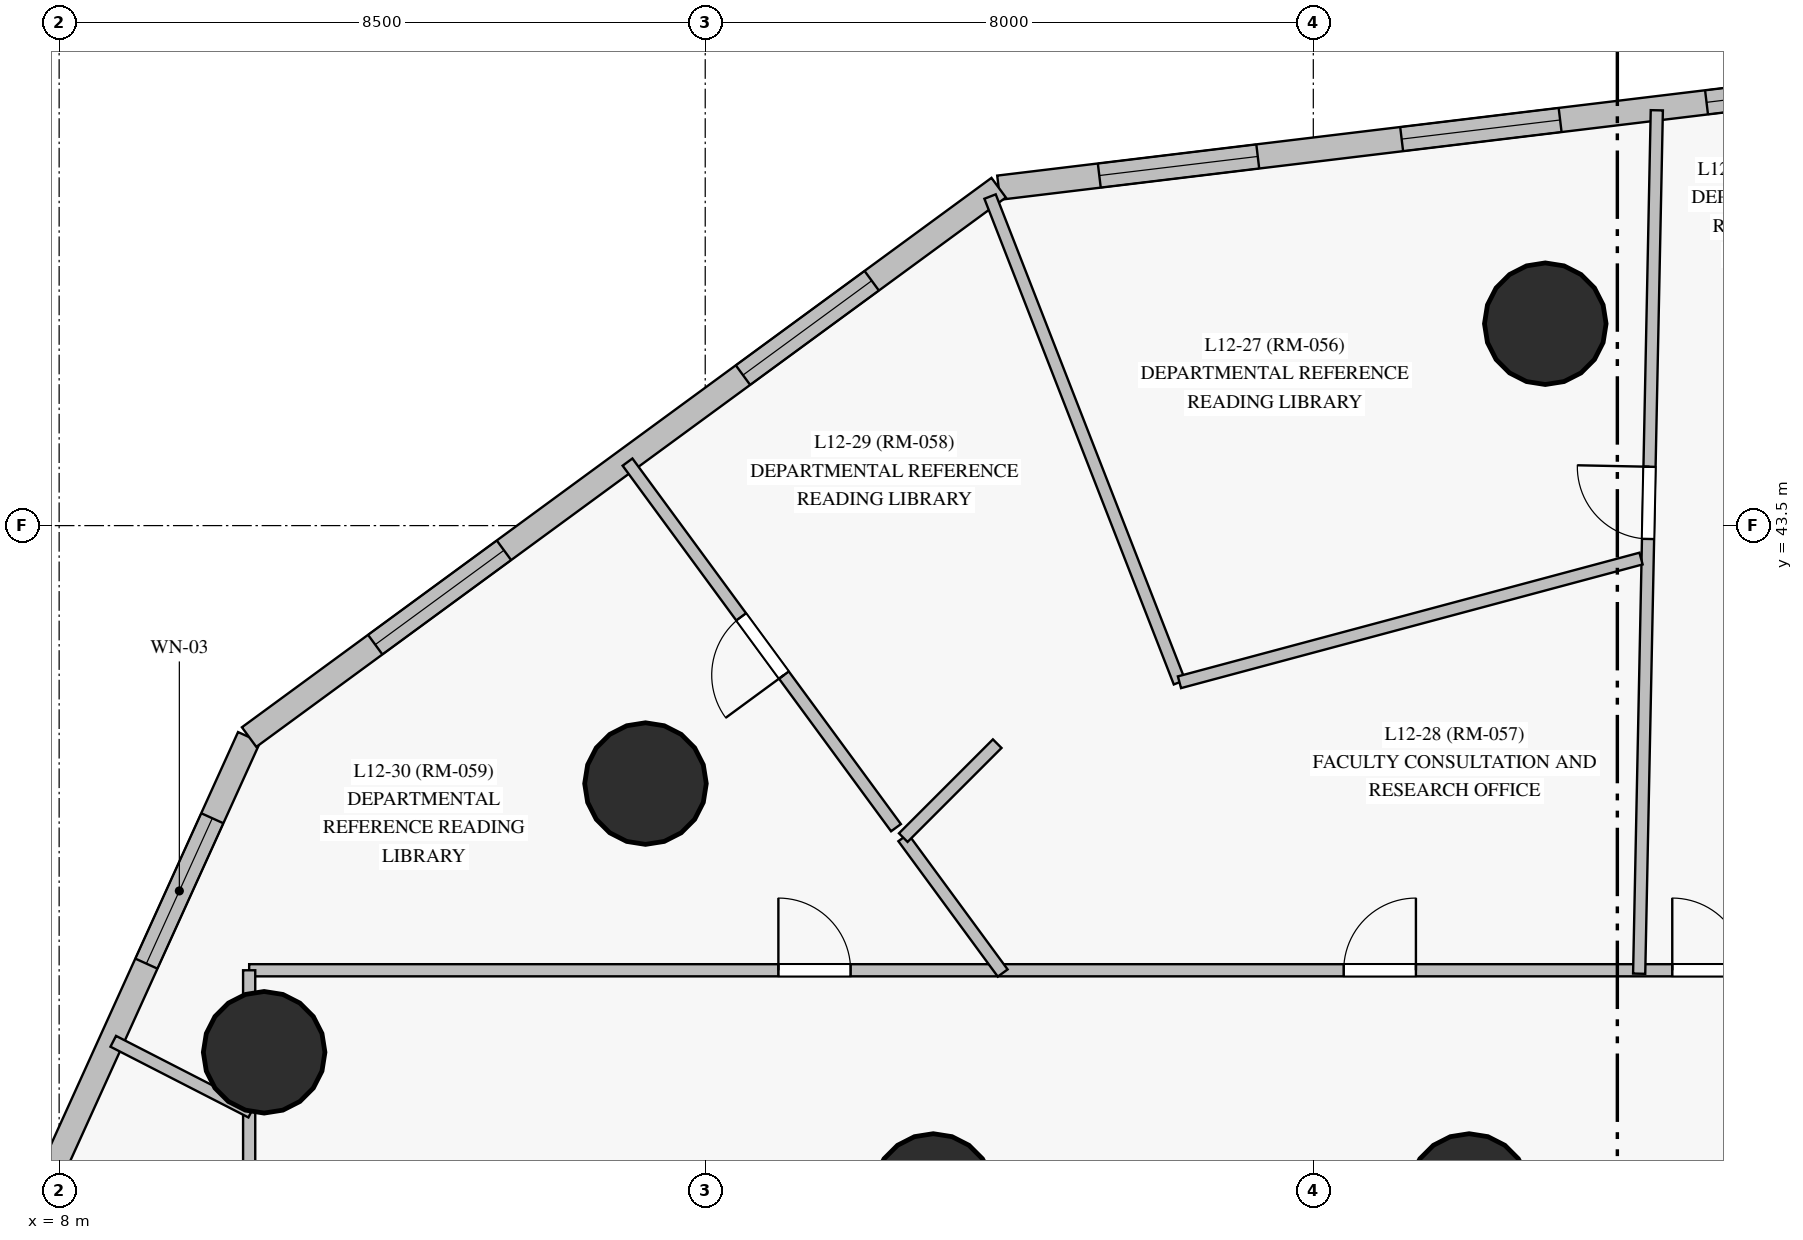
"""IFC4 building model, lengths in metres.
Left out: names, types, materials, properties, quantities, classifications, styles, units other than length and angle.
Written with IfcOpenShell. Run it as: python <this file> out.ifc"""

import sys

from ifc_helpers import new_model, si_unit, direction, frame, frame_2d, origin, origin_with_axes, origin_2d, place, context, subcontext, project, spatial, rectangle, circle, extrude, source, transform, mapped, element, fill, save


model = new_model("IFC4")
c1 = context("Model", 3, precision=1e-05, world=origin(), true_north=direction((0.0, 1.0)))
c2 = subcontext(c1, "Body", "Model", "MODEL_VIEW")
j1 = project(units=[si_unit("LENGTHUNIT", "METRE"), si_unit("PLANEANGLEUNIT", "RADIAN")], contexts=[c1])
p1 = place(None, origin())
s1 = spatial("IfcSite", under=j1, at=p1, CompositionType="ELEMENT")
p2 = place(p1, origin())
s2 = spatial("IfcBuilding", under=s1, at=p2, CompositionType="ELEMENT")
p3 = place(p2, frame((0.0, 0.0, 48.1)))
s3 = spatial("IfcBuildingStorey", under=s2, at=p3, CompositionType="ELEMENT", Elevation=48.1)
m1 = source(origin_with_axes(), c2, "Body", "SweptSolid", [
    extrude(circle(Radius=0.8, at=origin_2d()), origin(), (0.0, 0.0, 1.0), 3.6),
])
for number, where, z_axis, x_axis in (
    (1, (19.5, 34.7, 0.0), (0.0, 0.0, 1.0), (1.0, 0.0, 0.0)),
    (2, (26.55, 34.7, 0.0), (0.0, 0.0, 1.0), (1.0, 0.0, 0.0)),
    (3, (27.552, 46.156, 0.0), (0.0, 0.0, 1.0), (1.0, 0.0, 0.0)),
    (4, (15.714, 40.106, 0.0), (0.0, 0.0, 1.0), (1.0, 0.0, 0.0)),
    (5, (10.697, 36.571, 0.0), (0.0, 0.0, 1.0), (1.0, 0.0, 0.0)),
):
    element("IfcColumn", number, at=place(p3, frame(where, z_axis=z_axis, x_axis=x_axis)), inside=s3, PredefinedType="COLUMN", context=c2, shape_type="MappedRepresentation", body=[
        mapped(m1, transform((0.0, 0.0, 0.0), scale=1.0)),
    ])
p4 = place(p3, frame((10.499, 40.718, 0.0), z_axis=(0.0, 0.0, 1.0), x_axis=(-0.41300414516, -0.91072914529, 0.0)))
e6 = element("IfcWall", 6, at=p4, inside=s3, PredefinedType="SOLIDWALL", context=c2, shape_type="SweptSolid", body=[
    extrude(rectangle(XDim=15.224, YDim=0.32, at=frame_2d((7.612, 0.0))), origin(), (0.0, 0.0, 1.0), 3.35),
])
p5 = place(p4, frame((1.173, 0.0, 0.85)))
e7 = element("IfcOpeningElement", 7, at=p5, cuts=e6, PredefinedType="OPENING", context=c2, shape_type="SweptSolid", body=[
    extrude(rectangle(XDim=2.1, YDim=1.95, at=frame_2d((1.05, 0.975))), frame((0.0, 0.17, 0.0), z_axis=(0.0, -1.0, 0.0), x_axis=(1.0, 0.0, 0.0)), (0.0, 0.0, 1.0), 0.34),
])
p6 = place(p4, frame((6.603, 0.0, 0.85)))
e8 = element("IfcOpeningElement", 8, at=p6, cuts=e6, PredefinedType="OPENING", context=c2, shape_type="SweptSolid", body=[
    extrude(rectangle(XDim=2.1, YDim=1.95, at=frame_2d((1.05, 0.975))), frame((0.0, 0.17, 0.0), z_axis=(0.0, -1.0, 0.0), x_axis=(1.0, 0.0, 0.0)), (0.0, 0.0, 1.0), 0.34),
])
p7 = place(p4, frame((11.993, 0.0, 0.85)))
e9 = element("IfcOpeningElement", 9, at=p7, cuts=e6, PredefinedType="OPENING", context=c2, shape_type="SweptSolid", body=[
    extrude(rectangle(XDim=2.1, YDim=1.95, at=frame_2d((1.05, 0.975))), frame((0.0, 0.17, 0.0), z_axis=(0.0, -1.0, 0.0), x_axis=(1.0, 0.0, 0.0)), (0.0, 0.0, 1.0), 0.34),
])
p8 = place(p3, frame((35.475, 49.768, 0.0), z_axis=(0.0, 0.0, 1.0), x_axis=(-0.992812344763, -0.1196814442, 0.0)))
e10 = element("IfcWall", 10, at=p8, inside=s3, PredefinedType="SOLIDWALL", context=c2, shape_type="SweptSolid", body=[
    extrude(rectangle(XDim=15.224, YDim=0.32, at=frame_2d((7.612, 0.0))), origin(), (0.0, 0.0, 1.0), 3.35),
])
p9 = place(p8, frame((0.519, 0.0, 0.85)))
e11 = element("IfcOpeningElement", 11, at=p9, cuts=e10, PredefinedType="OPENING", context=c2, shape_type="SweptSolid", body=[
    extrude(rectangle(XDim=2.1, YDim=1.95, at=frame_2d((1.05, 0.975))), frame((0.0, 0.17, 0.0), z_axis=(0.0, -1.0, 0.0), x_axis=(1.0, 0.0, 0.0)), (0.0, 0.0, 1.0), 0.34),
])
p10 = place(p8, frame((3.744, 0.0, 0.85)))
e12 = element("IfcOpeningElement", 12, at=p10, cuts=e10, PredefinedType="OPENING", context=c2, shape_type="SweptSolid", body=[
    extrude(rectangle(XDim=2.1, YDim=1.95, at=frame_2d((1.05, 0.975))), frame((0.0, 0.17, 0.0), z_axis=(0.0, -1.0, 0.0), x_axis=(1.0, 0.0, 0.0)), (0.0, 0.0, 1.0), 0.34),
])
p11 = place(p8, frame((7.784, 0.0, 0.85)))
e13 = element("IfcOpeningElement", 13, at=p11, cuts=e10, PredefinedType="OPENING", context=c2, shape_type="SweptSolid", body=[
    extrude(rectangle(XDim=2.1, YDim=1.95, at=frame_2d((1.05, 0.975))), frame((0.0, 0.17, 0.0), z_axis=(0.0, -1.0, 0.0), x_axis=(1.0, 0.0, 0.0)), (0.0, 0.0, 1.0), 0.34),
])
p12 = place(p8, frame((11.791, 0.0, 0.85)))
e14 = element("IfcOpeningElement", 14, at=p12, cuts=e10, PredefinedType="OPENING", context=c2, shape_type="SweptSolid", body=[
    extrude(rectangle(XDim=2.1, YDim=1.95, at=frame_2d((1.05, 0.975))), frame((0.0, 0.17, 0.0), z_axis=(0.0, -1.0, 0.0), x_axis=(1.0, 0.0, 0.0)), (0.0, 0.0, 1.0), 0.34),
])
p13 = place(p3, frame((20.361, 47.946, 0.0), z_axis=(0.0, 0.0, 1.0), x_axis=(-0.806545902905, -0.591171469633, 0.0)))
e15 = element("IfcWall", 15, at=p13, inside=s3, PredefinedType="SOLIDWALL", context=c2, shape_type="SweptSolid", body=[
    extrude(rectangle(XDim=12.227, YDim=0.32, at=frame_2d((6.113, 0.0))), origin(), (0.0, 0.0, 1.0), 3.35),
])
p14 = place(p13, frame((2.071, 0.0, 0.85)))
e16 = element("IfcOpeningElement", 16, at=p14, cuts=e15, PredefinedType="OPENING", context=c2, shape_type="SweptSolid", body=[
    extrude(rectangle(XDim=2.1, YDim=1.95, at=frame_2d((1.05, 0.975))), frame((0.0, 0.17, 0.0), z_axis=(0.0, -1.0, 0.0), x_axis=(1.0, 0.0, 0.0)), (0.0, 0.0, 1.0), 0.34),
])
p15 = place(p13, frame((8.07, 0.0, 0.85)))
e17 = element("IfcOpeningElement", 17, at=p15, cuts=e15, PredefinedType="OPENING", context=c2, shape_type="SweptSolid", body=[
    extrude(rectangle(XDim=2.1, YDim=1.95, at=frame_2d((1.05, 0.975))), frame((0.0, 0.17, 0.0), z_axis=(0.0, -1.0, 0.0), x_axis=(1.0, 0.0, 0.0)), (0.0, 0.0, 1.0), 0.34),
])
p16 = place(p3, frame((10.5, 37.65, 0.0), z_axis=(0.0, 0.0, 1.0), x_axis=(1.0, 0.0, 0.0)))
e18 = element("IfcWall", 18, at=p16, inside=s3, PredefinedType="PARTITIONING", context=c2, shape_type="SweptSolid", body=[
    extrude(rectangle(XDim=29.75, YDim=0.16, at=frame_2d((14.875, 0.0))), origin(), (0.0, 0.0, 1.0), 2.75),
])
p17 = place(p16, frame((21.927, 0.0, 0.0)))
e19 = element("IfcOpeningElement", 19, at=p17, cuts=e18, PredefinedType="OPENING", context=c2, shape_type="SweptSolid", body=[
    extrude(rectangle(XDim=0.95, YDim=2.15, at=frame_2d((0.475, 1.075))), frame((0.0, 0.09, 0.0), z_axis=(0.0, -1.0, 0.0), x_axis=(1.0, 0.0, 0.0)), (0.0, 0.0, 1.0), 0.18),
])
p18 = place(p16, frame((20.262, 0.0, 0.0)))
e20 = element("IfcOpeningElement", 20, at=p18, cuts=e18, PredefinedType="OPENING", context=c2, shape_type="SweptSolid", body=[
    extrude(rectangle(XDim=0.95, YDim=2.15, at=frame_2d((0.475, 1.075))), frame((0.0, 0.09, 0.0), z_axis=(0.0, -1.0, 0.0), x_axis=(1.0, 0.0, 0.0)), (0.0, 0.0, 1.0), 0.18),
])
p19 = place(p16, frame((18.722, 0.0, 0.0)))
e21 = element("IfcOpeningElement", 21, at=p19, cuts=e18, PredefinedType="OPENING", context=c2, shape_type="SweptSolid", body=[
    extrude(rectangle(XDim=0.95, YDim=2.15, at=frame_2d((0.475, 1.075))), frame((0.0, 0.09, 0.0), z_axis=(0.0, -1.0, 0.0), x_axis=(1.0, 0.0, 0.0)), (0.0, 0.0, 1.0), 0.18),
])
p20 = place(p16, frame((14.4, 0.0, 0.0)))
e22 = element("IfcOpeningElement", 22, at=p20, cuts=e18, PredefinedType="OPENING", context=c2, shape_type="SweptSolid", body=[
    extrude(rectangle(XDim=0.95, YDim=2.15, at=frame_2d((0.475, 1.075))), frame((0.0, 0.09, 0.0), z_axis=(0.0, -1.0, 0.0), x_axis=(1.0, 0.0, 0.0)), (0.0, 0.0, 1.0), 0.18),
])
p21 = place(p16, frame((6.962, 0.0, 0.0)))
e23 = element("IfcOpeningElement", 23, at=p21, cuts=e18, PredefinedType="OPENING", context=c2, shape_type="SweptSolid", body=[
    extrude(rectangle(XDim=0.95, YDim=2.15, at=frame_2d((0.475, 1.075))), frame((0.0, 0.09, 0.0), z_axis=(0.0, -1.0, 0.0), x_axis=(1.0, 0.0, 0.0)), (0.0, 0.0, 1.0), 0.18),
])
p22 = place(p3, frame((10.5, 15.35, 0.0), z_axis=(0.0, 0.0, 1.0), x_axis=(0.0, 1.0, 0.0)))
e24 = element("IfcWall", 24, at=p22, inside=s3, PredefinedType="PARTITIONING", context=c2, shape_type="SweptSolid", body=[
    extrude(rectangle(XDim=22.3, YDim=0.16, at=frame_2d((11.15, 0.0))), origin(), (0.0, 0.0, 1.0), 2.75),
])
p23 = place(p22, frame((7.33, 0.0, 0.0)))
e25 = element("IfcOpeningElement", 25, at=p23, cuts=e24, PredefinedType="OPENING", context=c2, shape_type="SweptSolid", body=[
    extrude(rectangle(XDim=0.95, YDim=2.15, at=frame_2d((0.475, 1.075))), frame((0.0, 0.09, 0.0), z_axis=(0.0, -1.0, 0.0), x_axis=(1.0, 0.0, 0.0)), (0.0, 0.0, 1.0), 0.18),
])
p24 = place(p22, frame((2.893, 0.0, 0.0)))
e26 = element("IfcOpeningElement", 26, at=p24, cuts=e24, PredefinedType="OPENING", context=c2, shape_type="SweptSolid", body=[
    extrude(rectangle(XDim=0.96, YDim=2.15, at=frame_2d((0.48, 1.075))), frame((0.0, 0.09, 0.0), z_axis=(0.0, -1.0, 0.0), x_axis=(1.0, 0.0, 0.0)), (0.0, 0.0, 1.0), 0.18),
])
p25 = place(p22, frame((16.25, 0.0, 0.0)))
e27 = element("IfcOpeningElement", 27, at=p25, cuts=e24, PredefinedType="OPENING", context=c2, shape_type="SweptSolid", body=[
    extrude(rectangle(XDim=0.95, YDim=2.15, at=frame_2d((0.475, 1.075))), frame((0.0, 0.09, 0.0), z_axis=(0.0, -1.0, 0.0), x_axis=(1.0, 0.0, 0.0)), (0.0, 0.0, 1.0), 0.18),
])
p26 = place(p22, frame((11.165, 0.0, 0.0)))
e28 = element("IfcOpeningElement", 28, at=p26, cuts=e24, PredefinedType="OPENING", context=c2, shape_type="SweptSolid", body=[
    extrude(rectangle(XDim=0.95, YDim=2.15, at=frame_2d((0.475, 1.075))), frame((0.0, 0.09, 0.0), z_axis=(0.0, -1.0, 0.0), x_axis=(1.0, 0.0, 0.0)), (0.0, 0.0, 1.0), 0.18),
])
p27 = place(p3, frame((28.787, 37.605, 0.0), z_axis=(0.0, 0.0, 1.0), x_axis=(0.020435915355, 0.999791164876, 0.0)))
e29 = element("IfcWall", 29, at=p27, inside=s3, PredefinedType="PARTITIONING", context=c2, shape_type="SweptSolid", body=[
    extrude(rectangle(XDim=11.361, YDim=0.16, at=frame_2d((5.681, 0.0))), origin(), (0.0, 0.0, 1.0), 3.35),
])
p28 = place(p27, frame((5.721, 0.0, 0.0)))
e30 = element("IfcOpeningElement", 30, at=p28, cuts=e29, PredefinedType="OPENING", context=c2, shape_type="SweptSolid", body=[
    extrude(rectangle(XDim=0.95, YDim=2.15, at=frame_2d((0.475, 1.075))), frame((0.0, 0.09, 0.0), z_axis=(0.0, -1.0, 0.0), x_axis=(1.0, 0.0, 0.0)), (0.0, 0.0, 1.0), 0.18),
])
p29 = place(p3, frame((22.739, 41.439, 0.0), z_axis=(0.0, 0.0, 1.0), x_axis=(-0.363268958138, 0.931684315663, 0.0)))
e31 = element("IfcWall", 31, at=p29, inside=s3, PredefinedType="PARTITIONING", context=c2, shape_type="SweptSolid", body=[
    extrude(rectangle(XDim=6.858, YDim=0.16, at=frame_2d((3.429, 0.0))), origin(), (0.0, 0.0, 1.0), 3.35),
])
p30 = place(p3, frame((28.812, 43.066, 0.0), z_axis=(0.0, 0.0, 1.0), x_axis=(-0.96592551769, -0.258820196808, 0.0)))
e32 = element("IfcWall", 32, at=p30, inside=s3, PredefinedType="PARTITIONING", context=c2, shape_type="SweptSolid", body=[
    extrude(rectangle(XDim=6.287, YDim=0.16, at=frame_2d((3.144, 0.0))), origin(), (0.0, 0.0, 1.0), 2.75),
])
p31 = place(p3, frame((19.01, 39.526, 0.0), z_axis=(0.0, 0.0, 1.0), x_axis=(-0.59186548251, 0.806036755126, 0.0)))
e33 = element("IfcWall", 33, at=p31, inside=s3, PredefinedType="PARTITIONING", context=c2, shape_type="SweptSolid", body=[
    extrude(rectangle(XDim=5.968, YDim=0.16, at=frame_2d((2.984, 0.0))), origin(), (0.0, 0.0, 1.0), 3.35),
])
p32 = place(p31, frame((2.491, 0.0, 0.0)))
e34 = element("IfcOpeningElement", 34, at=p32, cuts=e33, PredefinedType="OPENING", context=c2, shape_type="SweptSolid", body=[
    extrude(rectangle(XDim=0.95, YDim=2.15, at=frame_2d((0.475, 1.075))), frame((0.0, 0.09, 0.0), z_axis=(0.0, -1.0, 0.0), x_axis=(1.0, 0.0, 0.0)), (0.0, 0.0, 1.0), 0.18),
])
p33 = place(p3, frame((20.414, 37.614, 0.0), z_axis=(0.0, 0.0, 1.0), x_axis=(-0.591928563028, 0.805990431874, 0.0)))
e35 = element("IfcWall", 35, at=p33, inside=s3, PredefinedType="PARTITIONING", context=c2, shape_type="SweptSolid", body=[
    extrude(rectangle(XDim=2.21, YDim=0.16, at=frame_2d((1.105, 0.0))), origin(), (0.0, 0.0, 1.0), 3.35),
])
p34 = place(p3, frame((10.527, 35.785, 0.0), z_axis=(0.0, 0.0, 1.0), x_axis=(-0.889807491926, 0.456336090303, 0.0)))
e36 = element("IfcWall", 36, at=p34, inside=s3, PredefinedType="PARTITIONING", context=c2, shape_type="SweptSolid", body=[
    extrude(rectangle(XDim=2.039, YDim=0.16, at=frame_2d((1.02, 0.0))), origin(), (0.0, 0.0, 1.0), 3.35),
])
p35 = place(p3, frame((19.105, 39.395, 0.0), z_axis=(0.0, 0.0, 1.0), x_axis=(0.707106781187, 0.707106781187, 0.0)))
e37 = element("IfcWall", 37, at=p35, inside=s3, PredefinedType="PARTITIONING", context=c2, shape_type="SweptSolid", body=[
    extrude(rectangle(XDim=1.748, YDim=0.16, at=frame_2d((0.874, 0.0))), origin(), (0.0, 0.0, 1.0), 2.75),
])
m2 = source(origin_with_axes(), c2, "Body", "SweptSolid", [
    extrude(rectangle(XDim=2.1, YDim=1.95, at=frame_2d((1.05, 0.975))), frame((0.0, 0.03, 0.0), z_axis=(0.0, -1.0, 0.0), x_axis=(1.0, 0.0, 0.0)), (0.0, 0.0, 1.0), 0.06),
])
p36 = place(p5, origin())
e38 = element("IfcWindow", 38, at=p36, inside=s3, PartitioningType="SINGLE_PANEL", PredefinedType="WINDOW", context=c2, shape_type="MappedRepresentation", body=[
    mapped(m2, transform((0.0, 0.0, 0.0), scale=1.0)),
])
fill(e7, e38)
p37 = place(p10, origin())
e39 = element("IfcWindow", 39, at=p37, inside=s3, PartitioningType="SINGLE_PANEL", PredefinedType="WINDOW", context=c2, shape_type="MappedRepresentation", body=[
    mapped(m2, transform((0.0, 0.0, 0.0), scale=1.0)),
])
fill(e12, e39)
p38 = place(p11, origin())
e40 = element("IfcWindow", 40, at=p38, inside=s3, PartitioningType="SINGLE_PANEL", PredefinedType="WINDOW", context=c2, shape_type="MappedRepresentation", body=[
    mapped(m2, transform((0.0, 0.0, 0.0), scale=1.0)),
])
fill(e13, e40)
p39 = place(p12, origin())
e41 = element("IfcWindow", 41, at=p39, inside=s3, PartitioningType="SINGLE_PANEL", PredefinedType="WINDOW", context=c2, shape_type="MappedRepresentation", body=[
    mapped(m2, transform((0.0, 0.0, 0.0), scale=1.0)),
])
fill(e14, e41)
p40 = place(p14, origin())
e42 = element("IfcWindow", 42, at=p40, inside=s3, PartitioningType="SINGLE_PANEL", PredefinedType="WINDOW", context=c2, shape_type="MappedRepresentation", body=[
    mapped(m2, transform((0.0, 0.0, 0.0), scale=1.0)),
])
fill(e16, e42)
p41 = place(p15, origin())
e43 = element("IfcWindow", 43, at=p41, inside=s3, PartitioningType="SINGLE_PANEL", PredefinedType="WINDOW", context=c2, shape_type="MappedRepresentation", body=[
    mapped(m2, transform((0.0, 0.0, 0.0), scale=1.0)),
])
fill(e17, e43)
m3 = source(origin_with_axes(), c2, "Body", "SweptSolid", [
    extrude(rectangle(XDim=0.95, YDim=2.15, at=frame_2d((0.475, 1.075))), frame((0.0, 0.025, 0.0), z_axis=(0.0, -1.0, 0.0), x_axis=(1.0, 0.0, 0.0)), (0.0, 0.0, 1.0), 0.05),
])
p42 = place(p19, origin())
e44 = element("IfcDoor", 44, at=p42, inside=s3, OperationType="SINGLE_SWING_LEFT", PredefinedType="DOOR", context=c2, shape_type="MappedRepresentation", body=[
    mapped(m3, transform((0.0, 0.0, 0.0), scale=1.0)),
])
fill(e21, e44)
p43 = place(p20, origin())
e45 = element("IfcDoor", 45, at=p43, inside=s3, OperationType="SINGLE_SWING_RIGHT", PredefinedType="DOOR", context=c2, shape_type="MappedRepresentation", body=[
    mapped(m3, transform((0.0, 0.0, 0.0), scale=1.0)),
])
fill(e22, e45)
p44 = place(p21, origin())
e46 = element("IfcDoor", 46, at=p44, inside=s3, OperationType="SINGLE_SWING_LEFT", PredefinedType="DOOR", context=c2, shape_type="MappedRepresentation", body=[
    mapped(m3, transform((0.0, 0.0, 0.0), scale=1.0)),
])
fill(e23, e46)
p45 = place(p28, origin())
e47 = element("IfcDoor", 47, at=p45, inside=s3, OperationType="SINGLE_SWING_RIGHT", PredefinedType="DOOR", context=c2, shape_type="MappedRepresentation", body=[
    mapped(m3, transform((0.0, 0.0, 0.0), scale=1.0)),
])
fill(e30, e47)
p46 = place(p32, origin())
e48 = element("IfcDoor", 48, at=p46, inside=s3, OperationType="SINGLE_SWING_LEFT", PredefinedType="DOOR", context=c2, shape_type="MappedRepresentation", body=[
    mapped(m3, transform((0.0, 0.0, 0.0), scale=1.0)),
])
fill(e34, e48)
save(model, sys.argv[1])
